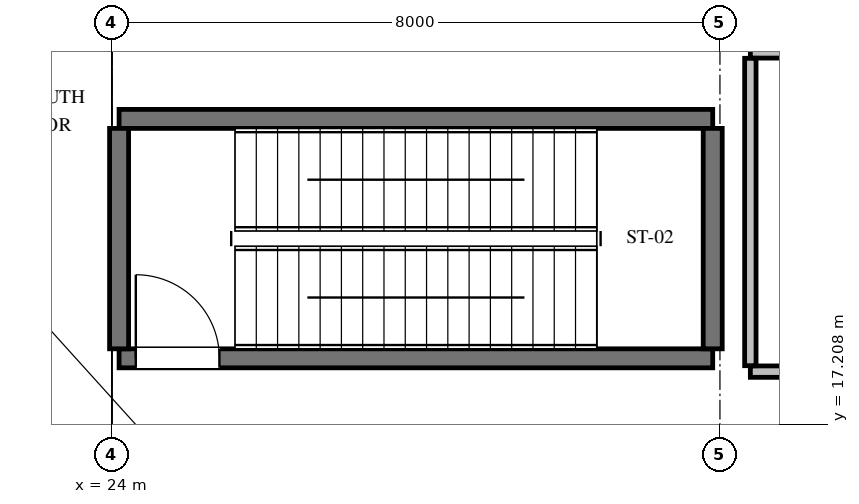
"""IFC4 building model, lengths in metres.
Left out: names, types, materials, properties, quantities, classifications, styles, units other than length and angle.
Written with IfcOpenShell. Run it as: python <this file> out.ifc"""

import sys

from ifc_helpers import new_model, si_unit, direction, frame, frame_2d, origin, place, context, subcontext, project, spatial, rectangle, extrude, element, fill, save


model = new_model("IFC4")
c1 = context("Model", 3, precision=1e-05, world=origin(), true_north=direction((0.0, 1.0)))
c2 = subcontext(c1, "Body", "Model", "MODEL_VIEW")
j1 = project(units=[si_unit("LENGTHUNIT", "METRE"), si_unit("PLANEANGLEUNIT", "RADIAN")], contexts=[c1])
p1 = place(None, origin())
s1 = spatial("IfcSite", under=j1, at=p1, CompositionType="ELEMENT")
p2 = place(p1, origin())
s2 = spatial("IfcBuilding", under=s1, at=p2, CompositionType="ELEMENT")
p3 = place(p2, frame((0.0, 0.0, 0.45)))
s3 = spatial("IfcBuildingStorey", under=s2, at=p3, CompositionType="ELEMENT", Elevation=0.45)
p4 = place(p3, frame((24.095, 18.075, 0.0), z_axis=(0.0, 0.0, 1.0), x_axis=(1.0, 0.0, 0.0)))
e1 = element("IfcWall", 1, at=p4, inside=s3, PredefinedType="SHEAR", context=c2, shape_type="SweptSolid", body=[
    extrude(rectangle(XDim=7.81, YDim=0.25, at=frame_2d((3.905, 0.0))), origin(), (0.0, 0.0, 1.0), 5.2),
])
p5 = place(p4, frame((0.22, 0.0, 0.0)))
e2 = element("IfcOpeningElement", 2, at=p5, cuts=e1, PredefinedType="OPENING", context=c2, shape_type="SweptSolid", body=[
    extrude(rectangle(XDim=1.1, YDim=2.15, at=frame_2d((0.55, 1.075))), frame((0.0, 0.135, 0.0), z_axis=(0.0, -1.0, 0.0), x_axis=(1.0, 0.0, 0.0)), (0.0, 0.0, 1.0), 0.27),
])
p6 = place(p3, frame((24.095, 21.225, 0.0), z_axis=(0.0, 0.0, 1.0), x_axis=(1.0, 0.0, 0.0)))
e3 = element("IfcWall", 3, at=p6, inside=s3, PredefinedType="SHEAR", context=c2, shape_type="SweptSolid", body=[
    extrude(rectangle(XDim=7.81, YDim=0.25, at=frame_2d((3.905, 0.0))), origin(), (0.0, 0.0, 1.0), 5.2),
])
for number, where, z_axis, x_axis in (
    (4, (24.095, 18.2, 0.0), (0.0, 0.0, 1.0), (0.0, 1.0, 0.0)),
    (5, (31.905, 18.2, 0.0), (0.0, 0.0, 1.0), (0.0, 1.0, 0.0)),
):
    element("IfcWall", number, at=place(p3, frame(where, z_axis=z_axis, x_axis=x_axis)), inside=s3, PredefinedType="SHEAR", context=c2, shape_type="SweptSolid", body=[
        extrude(rectangle(XDim=2.9, YDim=0.25, at=frame_2d((1.45, 0.0))), origin(), (0.0, 0.0, 1.0), 5.2),
    ])
p7 = place(p3, frame((32.4, 17.9, 0.0), z_axis=(0.0, 0.0, 1.0), x_axis=(1.0, 0.0, 0.0)))
e6 = element("IfcWall", 6, at=p7, inside=s3, PredefinedType="PARTITIONING", context=c2, shape_type="SweptSolid", body=[
    extrude(rectangle(XDim=5.2, YDim=0.15, at=frame_2d((2.6, 0.0))), origin(), (0.0, 0.0, 1.0), 5.2),
])
p8 = place(p7, frame((2.16, 0.0, 0.0)))
e7 = element("IfcOpeningElement", 7, at=p8, cuts=e6, PredefinedType="OPENING", context=c2, shape_type="SweptSolid", body=[
    extrude(rectangle(XDim=0.88, YDim=2.1, at=frame_2d((0.44, 1.05))), frame((0.0, 0.085, 0.0), z_axis=(0.0, -1.0, 0.0), x_axis=(1.0, 0.0, 0.0)), (0.0, 0.0, 1.0), 0.17),
])
p9 = place(p3, frame((32.4, 22.1, 0.0), z_axis=(0.0, 0.0, 1.0), x_axis=(1.0, 0.0, 0.0)))
e8 = element("IfcWall", 8, at=p9, inside=s3, PredefinedType="PARTITIONING", context=c2, shape_type="SweptSolid", body=[
    extrude(rectangle(XDim=5.2, YDim=0.15, at=frame_2d((2.6, 0.0))), origin(), (0.0, 0.0, 1.0), 5.2),
])
p10 = place(p3, frame((32.4, 17.978, 0.0), z_axis=(0.0, 0.0, 1.0), x_axis=(0.0, 1.0, 0.0)))
e9 = element("IfcWall", 9, at=p10, inside=s3, PredefinedType="PARTITIONING", context=c2, shape_type="SweptSolid", body=[
    extrude(rectangle(XDim=4.044, YDim=0.15, at=frame_2d((2.022, 0.0))), origin(), (0.0, 0.0, 1.0), 5.2),
])
p11 = place(p5, frame((1.1, 0.0, 0.0), z_axis=(0.0, 0.0, 1.0), x_axis=(-1.0, 0.0, 0.0)))
e10 = element("IfcDoor", 10, at=p11, inside=s3, OperationType="SINGLE_SWING_LEFT", PredefinedType="DOOR", context=c2, shape_type="SweptSolid", body=[
    extrude(rectangle(XDim=1.1, YDim=2.15, at=frame_2d((0.55, 1.075))), frame((0.0, 0.025, 0.0), z_axis=(0.0, -1.0, 0.0), x_axis=(1.0, 0.0, 0.0)), (0.0, 0.0, 1.0), 0.05),
])
fill(e2, e10)
save(model, sys.argv[1])
